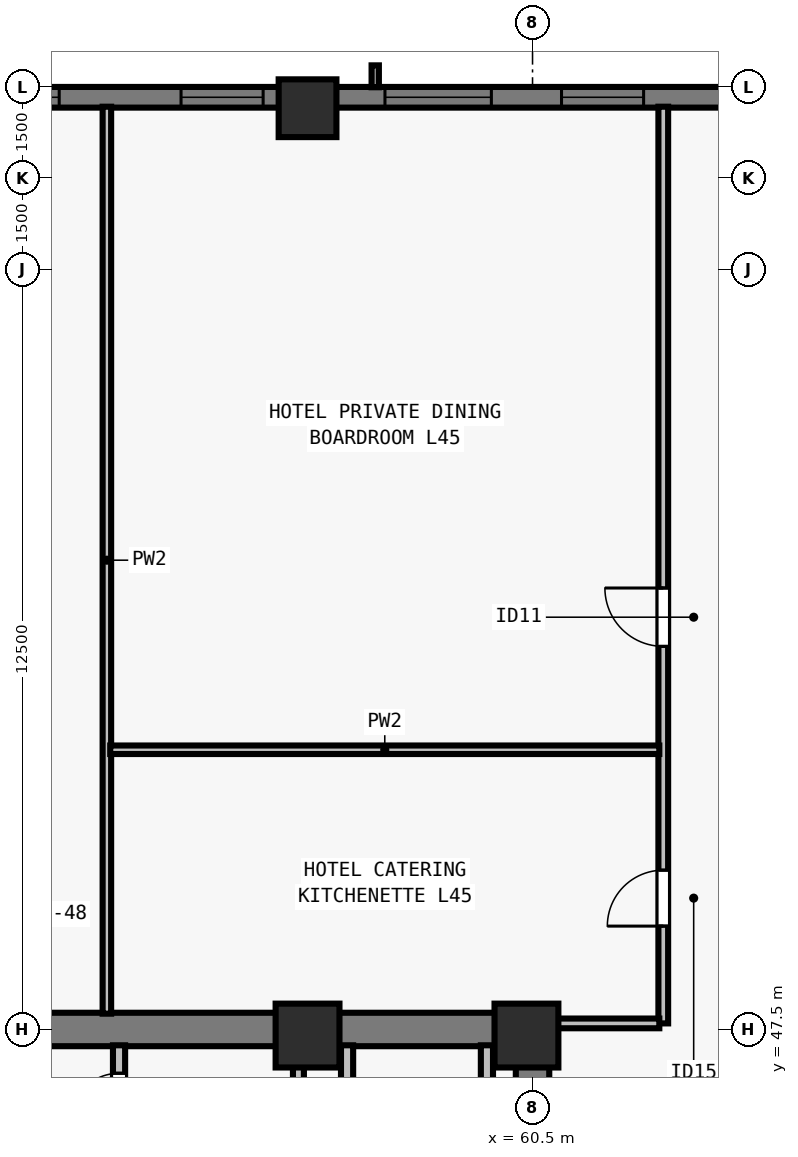
"""IFC4 building model, lengths in metres.
Left out: names, types, materials, properties, quantities, classifications, styles, units other than length and angle.
Written with IfcOpenShell. Run it as: python <this file> out.ifc"""

import sys

from ifc_helpers import new_model, si_unit, direction, frame, frame_2d, origin, origin_2d, place, context, subcontext, project, spatial, rectangle, extrude, element, fill, save


model = new_model("IFC4")
c1 = context("Model", 3, precision=1e-05, world=origin(), true_north=direction((0.0, 1.0)))
c2 = subcontext(c1, "Body", "Model", "MODEL_VIEW")
j1 = project(units=[si_unit("LENGTHUNIT", "METRE"), si_unit("PLANEANGLEUNIT", "RADIAN")], contexts=[c1])
p1 = place(None, origin())
s1 = spatial("IfcSite", under=j1, at=p1, CompositionType="ELEMENT")
p2 = place(p1, origin())
s2 = spatial("IfcBuilding", under=s1, at=p2, CompositionType="ELEMENT")
p3 = place(p2, frame((0.0, 0.0, 165.5)))
s3 = spatial("IfcBuildingStorey", under=s2, at=p3, CompositionType="ELEMENT", Elevation=165.5)
for number, where, z_axis, x_axis in (
    (1, (56.8, 47.4, 0.0), (0.0, 0.0, 1.0), (1.0, 0.0, 0.0)),
    (2, (60.4, 47.4, 0.0), (0.0, 0.0, 1.0), (1.0, 0.0, 0.0)),
):
    element("IfcColumn", number, at=place(p3, frame(where, z_axis=z_axis, x_axis=x_axis)), inside=s3, PredefinedType="COLUMN", context=c2, shape_type="SweptSolid", body=[
        extrude(rectangle(XDim=1.05, YDim=1.05, at=origin_2d()), origin(), (0.0, 0.0, 1.0), 3.5),
    ])
p4 = place(p3, frame((56.8, 62.65, 0.0), z_axis=(0.0, 0.0, 1.0), x_axis=(1.0, 0.0, 0.0)))
e3 = element("IfcColumn", 3, at=p4, inside=s3, PredefinedType="COLUMN", context=c2, shape_type="SweptSolid", body=[
    extrude(rectangle(XDim=0.95, YDim=0.95, at=origin_2d()), origin(), (0.0, 0.0, 1.0), 3.5),
])
p5 = place(p3, frame((32.0, 62.83, 0.0), z_axis=(0.0, 0.0, 1.0), x_axis=(1.0, 0.0, 0.0)))
e4 = element("IfcWall", 4, at=p5, inside=s3, PredefinedType="SOLIDWALL", context=c2, shape_type="SweptSolid", body=[
    extrude(rectangle(XDim=39.682, YDim=0.34, at=frame_2d((19.841, 0.0))), origin(), (0.0, 0.0, 1.0), 3.28),
])
p6 = place(p5, frame((3.902, 0.0, 0.8)))
e5 = element("IfcOpeningElement", 5, at=p6, cuts=e4, PredefinedType="OPENING", context=c2, shape_type="SweptSolid", body=[
    extrude(rectangle(XDim=1.75, YDim=1.66, at=frame_2d((0.875, 0.83))), frame((0.0, 0.18, 0.0), z_axis=(0.0, -1.0, 0.0), x_axis=(1.0, 0.0, 0.0)), (0.0, 0.0, 1.0), 0.36),
])
p7 = place(p5, frame((8.955, 0.0, 0.8)))
e6 = element("IfcOpeningElement", 6, at=p7, cuts=e4, PredefinedType="OPENING", context=c2, shape_type="SweptSolid", body=[
    extrude(rectangle(XDim=1.35, YDim=1.66, at=frame_2d((0.675, 0.83))), frame((0.0, 0.18, 0.0), z_axis=(0.0, -1.0, 0.0), x_axis=(1.0, 0.0, 0.0)), (0.0, 0.0, 1.0), 0.36),
])
p8 = place(p5, frame((11.859, 0.0, 0.8)))
e7 = element("IfcOpeningElement", 7, at=p8, cuts=e4, PredefinedType="OPENING", context=c2, shape_type="SweptSolid", body=[
    extrude(rectangle(XDim=1.75, YDim=1.66, at=frame_2d((0.875, 0.83))), frame((0.0, 0.18, 0.0), z_axis=(0.0, -1.0, 0.0), x_axis=(1.0, 0.0, 0.0)), (0.0, 0.0, 1.0), 0.36),
])
p9 = place(p5, frame((16.062, 0.0, 0.8)))
e8 = element("IfcOpeningElement", 8, at=p9, cuts=e4, PredefinedType="OPENING", context=c2, shape_type="SweptSolid", body=[
    extrude(rectangle(XDim=1.35, YDim=1.66, at=frame_2d((0.675, 0.83))), frame((0.0, 0.18, 0.0), z_axis=(0.0, -1.0, 0.0), x_axis=(1.0, 0.0, 0.0)), (0.0, 0.0, 1.0), 0.36),
])
p10 = place(p5, frame((18.966, 0.0, 0.8)))
e9 = element("IfcOpeningElement", 9, at=p10, cuts=e4, PredefinedType="OPENING", context=c2, shape_type="SweptSolid", body=[
    extrude(rectangle(XDim=1.75, YDim=1.66, at=frame_2d((0.875, 0.83))), frame((0.0, 0.18, 0.0), z_axis=(0.0, -1.0, 0.0), x_axis=(1.0, 0.0, 0.0)), (0.0, 0.0, 1.0), 0.36),
])
p11 = place(p5, frame((22.719, 0.0, 0.8)))
e10 = element("IfcOpeningElement", 10, at=p11, cuts=e4, PredefinedType="OPENING", context=c2, shape_type="SweptSolid", body=[
    extrude(rectangle(XDim=1.35, YDim=1.66, at=frame_2d((0.675, 0.83))), frame((0.0, 0.18, 0.0), z_axis=(0.0, -1.0, 0.0), x_axis=(1.0, 0.0, 0.0)), (0.0, 0.0, 1.0), 0.36),
])
p12 = place(p5, frame((26.073, 0.0, 0.8)))
e11 = element("IfcOpeningElement", 11, at=p12, cuts=e4, PredefinedType="OPENING", context=c2, shape_type="SweptSolid", body=[
    extrude(rectangle(XDim=1.75, YDim=1.66, at=frame_2d((0.875, 0.83))), frame((0.0, 0.18, 0.0), z_axis=(0.0, -1.0, 0.0), x_axis=(1.0, 0.0, 0.0)), (0.0, 0.0, 1.0), 0.36),
])
p13 = place(p5, frame((28.977, 0.0, 0.8)))
e12 = element("IfcOpeningElement", 12, at=p13, cuts=e4, PredefinedType="OPENING", context=c2, shape_type="SweptSolid", body=[
    extrude(rectangle(XDim=1.35, YDim=1.66, at=frame_2d((0.675, 0.83))), frame((0.0, 0.18, 0.0), z_axis=(0.0, -1.0, 0.0), x_axis=(1.0, 0.0, 0.0)), (0.0, 0.0, 1.0), 0.36),
])
p14 = place(p5, frame((33.18, 0.0, 0.8)))
e13 = element("IfcOpeningElement", 13, at=p14, cuts=e4, PredefinedType="OPENING", context=c2, shape_type="SweptSolid", body=[
    extrude(rectangle(XDim=1.75, YDim=1.66, at=frame_2d((0.875, 0.83))), frame((0.0, 0.18, 0.0), z_axis=(0.0, -1.0, 0.0), x_axis=(1.0, 0.0, 0.0)), (0.0, 0.0, 1.0), 0.36),
])
p15 = place(p3, frame((43.225, 47.5, 0.0), z_axis=(0.0, 0.0, 1.0), x_axis=(1.0, 0.0, 0.0)))
e14 = element("IfcWall", 14, at=p15, inside=s3, PredefinedType="SHEAR", context=c2, shape_type="SweptSolid", body=[
    extrude(rectangle(XDim=17.55, YDim=0.55, at=frame_2d((8.775, 0.0))), origin(), (0.0, 0.0, 1.0), 3.28),
])
p16 = place(p3, frame((60.5, 40.8, 0.0), z_axis=(0.0, 0.0, 1.0), x_axis=(0.0, 1.0, 0.0)))
e15 = element("IfcWall", 15, at=p16, inside=s3, PredefinedType="SHEAR", context=c2, shape_type="SweptSolid", body=[
    extrude(rectangle(XDim=6.435, YDim=0.55, at=frame_2d((3.218, 0.0))), origin(), (0.0, 0.0, 1.0), 3.28),
])
p17 = place(p3, frame((53.7, 40.585, 0.0), z_axis=(0.0, 0.0, 1.0), x_axis=(0.0, 1.0, 0.0)))
e16 = element("IfcWall", 16, at=p17, inside=s3, PredefinedType="SOLIDWALL", context=c2, shape_type="SweptSolid", body=[
    extrude(rectangle(XDim=6.655, YDim=0.2, at=frame_2d((3.328, 0.0))), origin(), (0.0, 0.0, 1.0), 3.28),
])
p18 = place(p17, frame((0.195, 0.0, 0.0)))
e17 = element("IfcOpeningElement", 17, at=p18, cuts=e16, PredefinedType="OPENING", context=c2, shape_type="SweptSolid", body=[
    extrude(rectangle(XDim=0.8, YDim=2.08, at=frame_2d((0.4, 1.04))), frame((0.0, 0.11, 0.0), z_axis=(0.0, -1.0, 0.0), x_axis=(1.0, 0.0, 0.0)), (0.0, 0.0, 1.0), 0.22),
])
p19 = place(p17, frame((3.735, 0.0, 0.0)))
e18 = element("IfcOpeningElement", 18, at=p19, cuts=e16, PredefinedType="OPENING", context=c2, shape_type="SweptSolid", body=[
    extrude(rectangle(XDim=0.9, YDim=2.12, at=frame_2d((0.45, 1.06))), frame((0.0, 0.11, 0.0), z_axis=(0.0, -1.0, 0.0), x_axis=(1.0, 0.0, 0.0)), (0.0, 0.0, 1.0), 0.22),
])
p20 = place(p17, frame((5.395, 0.0, 0.0)))
e19 = element("IfcOpeningElement", 19, at=p20, cuts=e16, PredefinedType="OPENING", context=c2, shape_type="SweptSolid", body=[
    extrude(rectangle(XDim=0.8, YDim=2.1, at=frame_2d((0.4, 1.05))), frame((0.0, 0.11, 0.0), z_axis=(0.0, -1.0, 0.0), x_axis=(1.0, 0.0, 0.0)), (0.0, 0.0, 1.0), 0.22),
])
for number, where, z_axis, x_axis in (
    (20, (57.45, 43.735, 0.0), (0.0, 0.0, 1.0), (0.0, 1.0, 0.0)),
    (21, (59.75, 43.735, 0.0), (0.0, 0.0, 1.0), (0.0, 1.0, 0.0)),
):
    element("IfcWall", number, at=place(p3, frame(where, z_axis=z_axis, x_axis=x_axis)), inside=s3, PredefinedType="SOLIDWALL", context=c2, shape_type="SweptSolid", body=[
        extrude(rectangle(XDim=3.505, YDim=0.2, at=frame_2d((1.752, 0.0))), origin(), (0.0, 0.0, 1.0), 3.28),
    ])
p21 = place(p3, frame((56.65, 43.735, 0.0), z_axis=(0.0, 0.0, 1.0), x_axis=(0.0, 1.0, 0.0)))
e22 = element("IfcWall", 22, at=p21, inside=s3, PredefinedType="SOLIDWALL", context=c2, shape_type="SweptSolid", body=[
    extrude(rectangle(XDim=3.505, YDim=0.18, at=frame_2d((1.752, 0.0))), origin(), (0.0, 0.0, 1.0), 3.28),
])
p22 = place(p3, frame((62.65, 47.6, 0.0), z_axis=(0.0, 0.0, 1.0), x_axis=(0.0, 1.0, 0.0)))
e23 = element("IfcWall", 23, at=p22, inside=s3, PredefinedType="PARTITIONING", context=c2, shape_type="SweptSolid", body=[
    extrude(rectangle(XDim=15.075, YDim=0.16, at=frame_2d((7.538, 0.0))), origin(), (0.0, 0.0, 1.0), 2.555),
])
p23 = place(p22, frame((1.6, 0.0, 0.0)))
e24 = element("IfcOpeningElement", 24, at=p23, cuts=e23, PredefinedType="OPENING", context=c2, shape_type="SweptSolid", body=[
    extrude(rectangle(XDim=0.92, YDim=2.12, at=frame_2d((0.46, 1.06))), frame((0.0, 0.09, 0.0), z_axis=(0.0, -1.0, 0.0), x_axis=(1.0, 0.0, 0.0)), (0.0, 0.0, 1.0), 0.18),
])
p24 = place(p22, frame((6.2, 0.0, 0.0)))
e25 = element("IfcOpeningElement", 25, at=p24, cuts=e23, PredefinedType="OPENING", context=c2, shape_type="SweptSolid", body=[
    extrude(rectangle(XDim=0.96, YDim=2.12, at=frame_2d((0.48, 1.06))), frame((0.0, 0.09, 0.0), z_axis=(0.0, -1.0, 0.0), x_axis=(1.0, 0.0, 0.0)), (0.0, 0.0, 1.0), 0.18),
])
p25 = place(p3, frame((60.765, 47.6, 0.0), z_axis=(0.0, 0.0, 1.0), x_axis=(1.0, 0.0, 0.0)))
e26 = element("IfcWall", 26, at=p25, inside=s3, PredefinedType="PARTITIONING", context=c2, shape_type="SweptSolid", body=[
    extrude(rectangle(XDim=1.82, YDim=0.16, at=frame_2d((0.91, 0.0))), origin(), (0.0, 0.0, 1.0), 3.28),
])
p26 = place(p3, frame((53.5, 47.76, 0.0), z_axis=(0.0, 0.0, 1.0), x_axis=(0.0, 1.0, 0.0)))
e27 = element("IfcWall", 27, at=p26, inside=s3, PredefinedType="PARTITIONING", context=c2, shape_type="SweptSolid", body=[
    extrude(rectangle(XDim=14.915, YDim=0.14, at=frame_2d((7.458, 0.0))), origin(), (0.0, 0.0, 1.0), 2.896),
])
p27 = place(p3, frame((53.555, 52.1, 0.0), z_axis=(0.0, 0.0, 1.0), x_axis=(1.0, 0.0, 0.0)))
e28 = element("IfcWall", 28, at=p27, inside=s3, PredefinedType="PARTITIONING", context=c2, shape_type="SweptSolid", body=[
    extrude(rectangle(XDim=9.03, YDim=0.14, at=frame_2d((4.515, 0.0))), origin(), (0.0, 0.0, 1.0), 3.28),
])
p28 = place(p10, origin())
e29 = element("IfcWindow", 29, at=p28, inside=s3, PartitioningType="SINGLE_PANEL", PredefinedType="WINDOW", context=c2, shape_type="SweptSolid", body=[
    extrude(rectangle(XDim=1.75, YDim=1.66, at=frame_2d((0.875, 0.83))), frame((0.0, -0.05, 0.0), z_axis=(0.0, -1.0, 0.0), x_axis=(1.0, 0.0, 0.0)), (0.0, 0.0, 1.0), 0.06),
])
fill(e9, e29)
p29 = place(p11, origin())
e30 = element("IfcWindow", 30, at=p29, inside=s3, PartitioningType="SINGLE_PANEL", PredefinedType="WINDOW", context=c2, shape_type="SweptSolid", body=[
    extrude(rectangle(XDim=1.35, YDim=1.66, at=frame_2d((0.675, 0.83))), frame((0.0, -0.05, 0.0), z_axis=(0.0, -1.0, 0.0), x_axis=(1.0, 0.0, 0.0)), (0.0, 0.0, 1.0), 0.06),
])
fill(e10, e30)
p30 = place(p12, origin())
e31 = element("IfcWindow", 31, at=p30, inside=s3, PartitioningType="SINGLE_PANEL", PredefinedType="WINDOW", context=c2, shape_type="SweptSolid", body=[
    extrude(rectangle(XDim=1.75, YDim=1.66, at=frame_2d((0.875, 0.83))), frame((0.0, -0.05, 0.0), z_axis=(0.0, -1.0, 0.0), x_axis=(1.0, 0.0, 0.0)), (0.0, 0.0, 1.0), 0.06),
])
fill(e11, e31)
p31 = place(p13, origin())
e32 = element("IfcWindow", 32, at=p31, inside=s3, PartitioningType="SINGLE_PANEL", PredefinedType="WINDOW", context=c2, shape_type="SweptSolid", body=[
    extrude(rectangle(XDim=1.35, YDim=1.66, at=frame_2d((0.675, 0.83))), frame((0.0, -0.05, 0.0), z_axis=(0.0, -1.0, 0.0), x_axis=(1.0, 0.0, 0.0)), (0.0, 0.0, 1.0), 0.06),
])
fill(e12, e32)
p32 = place(p20, origin())
e33 = element("IfcDoor", 33, at=p32, inside=s3, OperationType="SINGLE_SWING_LEFT", PredefinedType="DOOR", context=c2, shape_type="SweptSolid", body=[
    extrude(rectangle(XDim=0.8, YDim=2.1, at=frame_2d((0.4, 1.05))), frame((0.0, 0.025, 0.0), z_axis=(0.0, -1.0, 0.0), x_axis=(1.0, 0.0, 0.0)), (0.0, 0.0, 1.0), 0.05),
])
fill(e19, e33)
p33 = place(p23, origin())
e34 = element("IfcDoor", 34, at=p33, inside=s3, OperationType="SINGLE_SWING_LEFT", PredefinedType="DOOR", context=c2, shape_type="SweptSolid", body=[
    extrude(rectangle(XDim=0.92, YDim=2.12, at=frame_2d((0.46, 1.06))), frame((0.0, 0.025, 0.0), z_axis=(0.0, -1.0, 0.0), x_axis=(1.0, 0.0, 0.0)), (0.0, 0.0, 1.0), 0.05),
])
fill(e24, e34)
p34 = place(p24, origin())
e35 = element("IfcDoor", 35, at=p34, inside=s3, OperationType="SINGLE_SWING_RIGHT", PredefinedType="DOOR", context=c2, shape_type="SweptSolid", body=[
    extrude(rectangle(XDim=0.96, YDim=2.12, at=frame_2d((0.48, 1.06))), frame((0.0, 0.025, 0.0), z_axis=(0.0, -1.0, 0.0), x_axis=(1.0, 0.0, 0.0)), (0.0, 0.0, 1.0), 0.05),
])
fill(e25, e35)
save(model, sys.argv[1])
